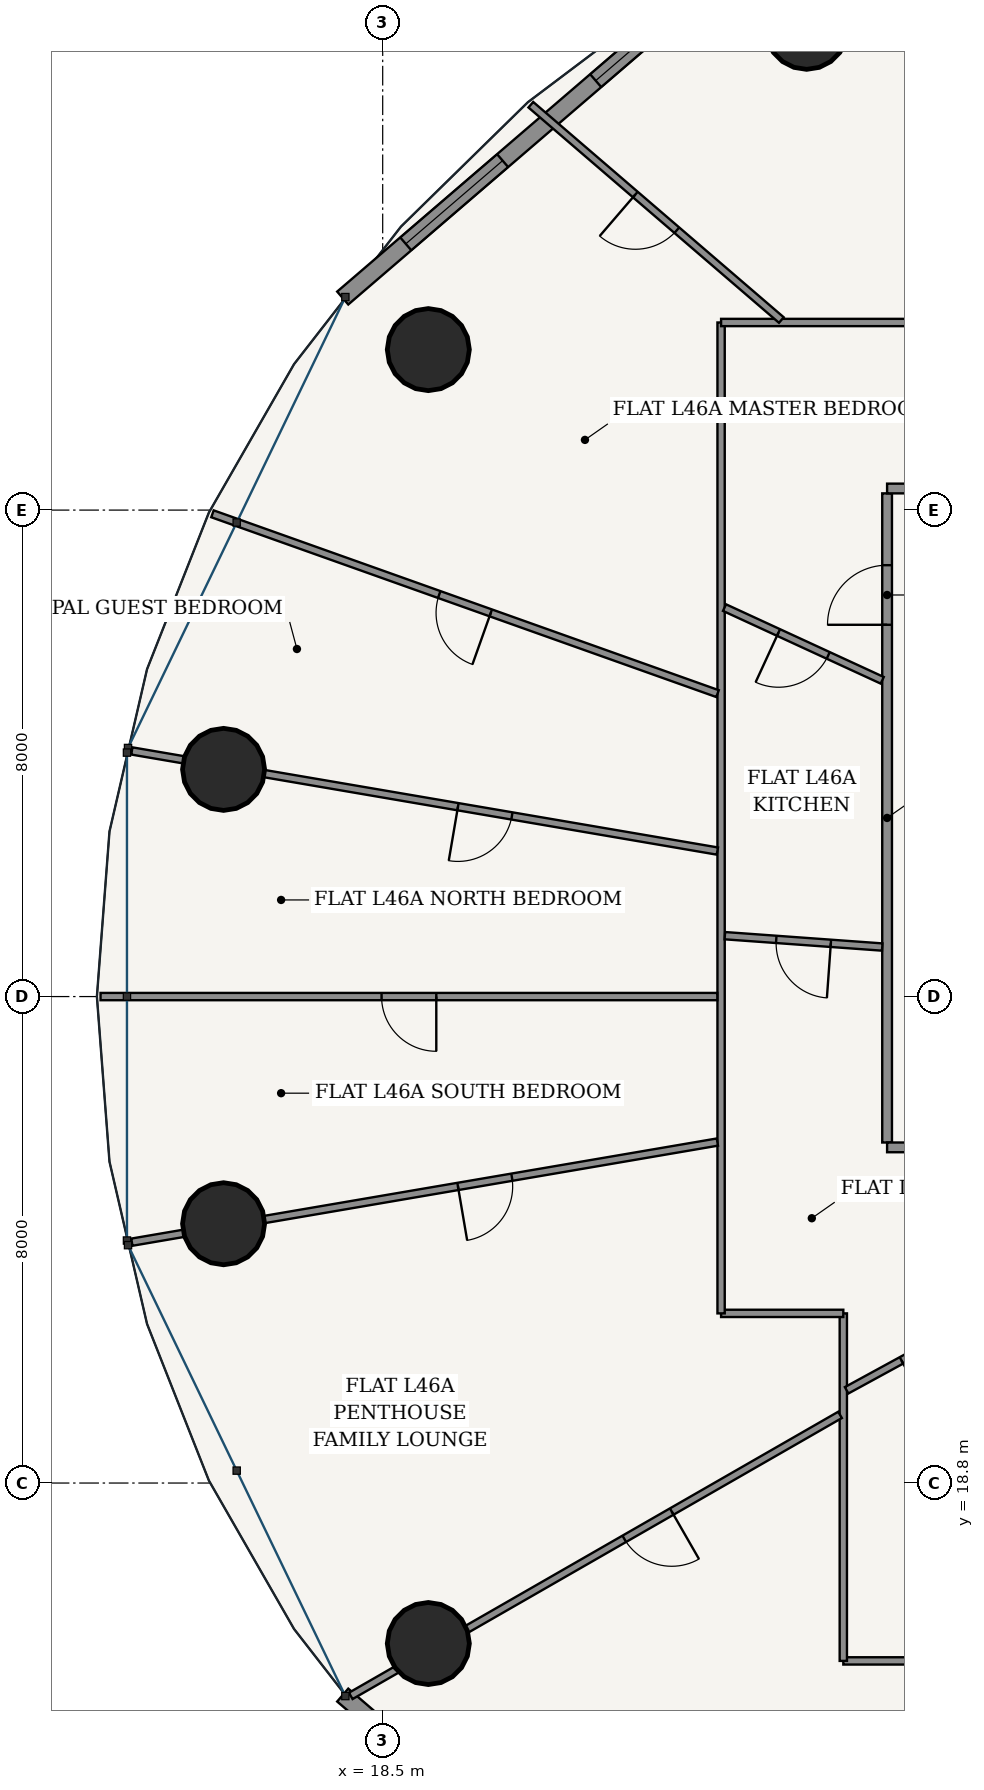
"""IFC4 building model, lengths in metres.
Left out: names, types, materials, properties, quantities, classifications, styles, units other than length and angle.
Written with IfcOpenShell. Run it as: python <this file> out.ifc"""

import sys

from ifc_helpers import new_model, si_unit, direction, frame, frame_2d, origin, origin_2d, place, context, subcontext, project, spatial, rectangle, hollow_circle, extrude, source, transform, mapped, element, fill, save


model = new_model("IFC4")
c1 = context("Model", 3, precision=1e-05, world=origin(), true_north=direction((-0.2419218956, 0.970295726276)))
c2 = subcontext(c1, "Body", "Model", "MODEL_VIEW")
j1 = project(units=[si_unit("LENGTHUNIT", "METRE"), si_unit("PLANEANGLEUNIT", "RADIAN")], contexts=[c1])
p1 = place(None, origin())
s1 = spatial("IfcSite", under=j1, at=p1, CompositionType="ELEMENT")
p2 = place(p1, origin())
s2 = spatial("IfcBuilding", under=s1, at=p2, CompositionType="ELEMENT")
p3 = place(p2, frame((0.0, 0.0, 175.0)))
s3 = spatial("IfcBuildingStorey", under=s2, at=p3, CompositionType="ELEMENT", Elevation=175.0)
for number, where, z_axis, x_axis in (
    (1, (25.472, 42.723, 0.0), (0.0, 0.0, 1.0), (1.0, 0.0, 0.0)),
    (2, (19.25, 37.439, 0.0), (0.0, 0.0, 1.0), (1.0, 0.0, 0.0)),
    (3, (15.883, 30.536, 0.0), (0.0, 0.0, 1.0), (1.0, 0.0, 0.0)),
    (4, (15.883, 23.064, 0.0), (0.0, 0.0, 1.0), (1.0, 0.0, 0.0)),
    (5, (19.25, 16.161, 0.0), (0.0, 0.0, 1.0), (1.0, 0.0, 0.0)),
):
    element("IfcColumn", number, at=place(p3, frame(where, z_axis=z_axis, x_axis=x_axis)), inside=s3, PredefinedType="COLUMN", context=c2, shape_type="SweptSolid", body=[
        extrude(hollow_circle(Radius=0.675, WallThickness=0.042, at=origin_2d()), origin(), (0.0, 0.0, 1.0), 3.6),
    ])
p4 = place(p3, frame((24.633, 44.122, 0.0), z_axis=(0.0, 0.0, 1.0), x_axis=(-0.75843401647, -0.651749831348, 0.0)))
e6 = element("IfcWall", 6, at=p4, inside=s3, PredefinedType="SOLIDWALL", context=c2, shape_type="SweptSolid", body=[
    extrude(rectangle(XDim=8.952, YDim=0.28, at=frame_2d((4.476, 0.0))), origin(), (0.0, 0.0, 1.0), 3.33),
])
p5 = place(p4, frame((1.367, 0.0, 0.85)))
e7 = element("IfcOpeningElement", 7, at=p5, cuts=e6, PredefinedType="OPENING", context=c2, shape_type="SweptSolid", body=[
    extrude(rectangle(XDim=2.1, YDim=1.95, at=frame_2d((1.05, 0.975))), frame((0.0, 0.15, 0.0), z_axis=(0.0, -1.0, 0.0), x_axis=(1.0, 0.0, 0.0)), (0.0, 0.0, 1.0), 0.3),
])
p6 = place(p4, frame((5.485, 0.0, 0.85)))
e8 = element("IfcOpeningElement", 8, at=p6, cuts=e6, PredefinedType="OPENING", context=c2, shape_type="SweptSolid", body=[
    extrude(rectangle(XDim=2.1, YDim=1.95, at=frame_2d((1.05, 0.975))), frame((0.0, 0.15, 0.0), z_axis=(0.0, -1.0, 0.0), x_axis=(1.0, 0.0, 0.0)), (0.0, 0.0, 1.0), 0.3),
])
p7 = place(p3, frame((17.843, 15.313, 0.0), z_axis=(0.0, 0.0, 1.0), x_axis=(0.75843401647, -0.651749831348, 0.0)))
e9 = element("IfcWall", 9, at=p7, inside=s3, PredefinedType="SOLIDWALL", context=c2, shape_type="SweptSolid", body=[
    extrude(rectangle(XDim=8.952, YDim=0.28, at=frame_2d((4.476, 0.0))), origin(), (0.0, 0.0, 1.0), 3.33),
])
p8 = place(p7, frame((1.367, 0.0, 0.85)))
e10 = element("IfcOpeningElement", 10, at=p8, cuts=e9, PredefinedType="OPENING", context=c2, shape_type="SweptSolid", body=[
    extrude(rectangle(XDim=2.1, YDim=1.95, at=frame_2d((1.05, 0.975))), frame((0.0, 0.15, 0.0), z_axis=(0.0, -1.0, 0.0), x_axis=(1.0, 0.0, 0.0)), (0.0, 0.0, 1.0), 0.3),
])
p9 = place(p7, frame((5.485, 0.0, 0.85)))
e11 = element("IfcOpeningElement", 11, at=p9, cuts=e9, PredefinedType="OPENING", context=c2, shape_type="SweptSolid", body=[
    extrude(rectangle(XDim=2.1, YDim=1.95, at=frame_2d((1.05, 0.975))), frame((0.0, 0.15, 0.0), z_axis=(0.0, -1.0, 0.0), x_axis=(1.0, 0.0, 0.0)), (0.0, 0.0, 1.0), 0.3),
])
p10 = place(p3, frame((26.795, 24.4, 0.0), z_axis=(0.0, 0.0, 1.0), x_axis=(0.0, 1.0, 0.0)))
e12 = element("IfcWall", 12, at=p10, inside=s3, PredefinedType="PARTITIONING", context=c2, shape_type="SweptSolid", body=[
    extrude(rectangle(XDim=10.675, YDim=0.16, at=frame_2d((5.337, 0.0))), origin(), (0.0, 0.0, 1.0), 2.776),
])
p11 = place(p10, frame((8.514, 0.0, 0.0)))
e13 = element("IfcOpeningElement", 13, at=p11, cuts=e12, PredefinedType="OPENING", context=c2, shape_type="SweptSolid", body=[
    extrude(rectangle(XDim=0.98, YDim=2.2, at=frame_2d((0.49, 1.1))), frame((0.0, 0.09, 0.0), z_axis=(0.0, -1.0, 0.0), x_axis=(1.0, 0.0, 0.0)), (0.0, 0.0, 1.0), 0.18),
])
p12 = place(p3, frame((26.795, 35.155, 0.0), z_axis=(0.0, 0.0, 1.0), x_axis=(1.0, 0.0, 0.0)))
e14 = element("IfcWall", 14, at=p12, inside=s3, PredefinedType="PARTITIONING", context=c2, shape_type="SweptSolid", body=[
    extrude(rectangle(XDim=1.93, YDim=0.16, at=frame_2d((0.965, 0.0))), origin(), (0.0, 0.0, 1.0), 2.776),
])
p13 = place(p3, frame((26.795, 24.32, 0.0), z_axis=(0.0, 0.0, 1.0), x_axis=(1.0, 0.0, 0.0)))
e15 = element("IfcWall", 15, at=p13, inside=s3, PredefinedType="PARTITIONING", context=c2, shape_type="SweptSolid", body=[
    extrude(rectangle(XDim=1.93, YDim=0.16, at=frame_2d((0.965, 0.0))), origin(), (0.0, 0.0, 1.0), 3.33),
])
p14 = place(p3, frame((31.59, 15.875, 0.0), z_axis=(0.0, 0.0, 1.0), x_axis=(-1.0, 0.0, 0.0)))
e16 = element("IfcWall", 16, at=p14, inside=s3, PredefinedType="PARTITIONING", context=c2, shape_type="SweptSolid", body=[
    extrude(rectangle(XDim=5.515, YDim=0.12, at=frame_2d((2.758, 0.0))), origin(), (0.0, 0.0, 1.0), 2.776),
])
p15 = place(p3, frame((26.075, 15.875, 0.0), z_axis=(0.0, 0.0, 1.0), x_axis=(0.0, 1.0, 0.0)))
e17 = element("IfcWall", 17, at=p15, inside=s3, PredefinedType="PARTITIONING", context=c2, shape_type="SweptSolid", body=[
    extrude(rectangle(XDim=5.715, YDim=0.12, at=frame_2d((2.857, 0.0))), origin(), (0.0, 0.0, 1.0), 2.776),
])
p16 = place(p3, frame((26.075, 21.59, 0.0), z_axis=(0.0, 0.0, 1.0), x_axis=(-1.0, 0.0, 0.0)))
e18 = element("IfcWall", 18, at=p16, inside=s3, PredefinedType="PARTITIONING", context=c2, shape_type="SweptSolid", body=[
    extrude(rectangle(XDim=2.01, YDim=0.12, at=frame_2d((1.005, 0.0))), origin(), (0.0, 0.0, 1.0), 3.33),
])
p17 = place(p3, frame((24.065, 21.59, 0.0), z_axis=(0.0, 0.0, 1.0), x_axis=(0.0, 1.0, 0.0)))
e19 = element("IfcWall", 19, at=p17, inside=s3, PredefinedType="PARTITIONING", context=c2, shape_type="SweptSolid", body=[
    extrude(rectangle(XDim=16.295, YDim=0.12, at=frame_2d((8.147, 0.0))), origin(), (0.0, 0.0, 1.0), 2.776),
])
p18 = place(p3, frame((24.065, 37.885, 0.0), z_axis=(0.0, 0.0, 1.0), x_axis=(1.0, 0.0, 0.0)))
e20 = element("IfcWall", 20, at=p18, inside=s3, PredefinedType="PARTITIONING", context=c2, shape_type="SweptSolid", body=[
    extrude(rectangle(XDim=7.47, YDim=0.12, at=frame_2d((3.735, 0.0))), origin(), (0.0, 0.0, 1.0), 2.776),
])
p19 = place(p18, frame((3.62, 0.0, 0.0)))
e21 = element("IfcOpeningElement", 21, at=p19, cuts=e20, PredefinedType="OPENING", context=c2, shape_type="SweptSolid", body=[
    extrude(rectangle(XDim=0.9, YDim=2.15, at=frame_2d((0.45, 1.075))), frame((0.0, 0.07, 0.0), z_axis=(0.0, -1.0, 0.0), x_axis=(1.0, 0.0, 0.0)), (0.0, 0.0, 1.0), 0.14),
])
p20 = place(p3, frame((25.056, 37.925, 0.0), z_axis=(0.0, 0.0, 1.0), x_axis=(-0.758354915574, 0.65184186888, 0.0)))
e22 = element("IfcWall", 22, at=p20, inside=s3, PredefinedType="PARTITIONING", context=c2, shape_type="SweptSolid", body=[
    extrude(rectangle(XDim=5.432, YDim=0.12, at=frame_2d((2.716, 0.0))), origin(), (0.0, 0.0, 1.0), 2.846),
])
p21 = place(p20, frame((2.266, 0.0, 0.0)))
e23 = element("IfcOpeningElement", 23, at=p21, cuts=e22, PredefinedType="OPENING", context=c2, shape_type="SweptSolid", body=[
    extrude(rectangle(XDim=0.9, YDim=2.15, at=frame_2d((0.45, 1.075))), frame((0.0, 0.07, 0.0), z_axis=(0.0, -1.0, 0.0), x_axis=(1.0, 0.0, 0.0)), (0.0, 0.0, 1.0), 0.14),
])
p22 = place(p3, frame((24.007, 31.782, 0.0), z_axis=(0.0, 0.0, 1.0), x_axis=(-0.942077868165, 0.335394231187, 0.0)))
e24 = element("IfcWall", 24, at=p22, inside=s3, PredefinedType="PARTITIONING", context=c2, shape_type="SweptSolid", body=[
    extrude(rectangle(XDim=8.817, YDim=0.12, at=frame_2d((4.408, 0.0))), origin(), (0.0, 0.0, 1.0), 2.846),
])
p23 = place(p22, frame((3.958, 0.0, 0.0)))
e25 = element("IfcOpeningElement", 25, at=p23, cuts=e24, PredefinedType="OPENING", context=c2, shape_type="SweptSolid", body=[
    extrude(rectangle(XDim=0.9, YDim=2.15, at=frame_2d((0.45, 1.075))), frame((0.0, 0.07, 0.0), z_axis=(0.0, -1.0, 0.0), x_axis=(1.0, 0.0, 0.0)), (0.0, 0.0, 1.0), 0.14),
])
p24 = place(p3, frame((24.004, 29.193, 0.0), z_axis=(0.0, 0.0, 1.0), x_axis=(-0.985698378271, 0.168519159369, 0.0)))
e26 = element("IfcWall", 26, at=p24, inside=s3, PredefinedType="PARTITIONING", context=c2, shape_type="SweptSolid", body=[
    extrude(rectangle(XDim=9.769, YDim=0.12, at=frame_2d((4.884, 0.0))), origin(), (0.0, 0.0, 1.0), 2.776),
])
p25 = place(p24, frame((3.428, 0.0, 0.0)))
e27 = element("IfcOpeningElement", 27, at=p25, cuts=e26, PredefinedType="OPENING", context=c2, shape_type="SweptSolid", body=[
    extrude(rectangle(XDim=0.9, YDim=2.15, at=frame_2d((0.45, 1.075))), frame((0.0, 0.07, 0.0), z_axis=(0.0, -1.0, 0.0), x_axis=(1.0, 0.0, 0.0)), (0.0, 0.0, 1.0), 0.14),
])
p26 = place(p3, frame((24.003, 26.8, 0.0), z_axis=(0.0, 0.0, 1.0), x_axis=(-1.0, 0.0, 0.0)))
e28 = element("IfcWall", 28, at=p26, inside=s3, PredefinedType="PARTITIONING", context=c2, shape_type="SweptSolid", body=[
    extrude(rectangle(XDim=10.143, YDim=0.12, at=frame_2d((5.071, 0.0))), origin(), (0.0, 0.0, 1.0), 2.846),
])
p27 = place(p26, frame((4.622, 0.0, 0.0)))
e29 = element("IfcOpeningElement", 29, at=p27, cuts=e28, PredefinedType="OPENING", context=c2, shape_type="SweptSolid", body=[
    extrude(rectangle(XDim=0.9, YDim=2.15, at=frame_2d((0.45, 1.075))), frame((0.0, 0.07, 0.0), z_axis=(0.0, -1.0, 0.0), x_axis=(1.0, 0.0, 0.0)), (0.0, 0.0, 1.0), 0.14),
])
p28 = place(p3, frame((24.004, 24.407, 0.0), z_axis=(0.0, 0.0, 1.0), x_axis=(-0.985698378271, -0.168519159369, 0.0)))
e30 = element("IfcWall", 30, at=p28, inside=s3, PredefinedType="PARTITIONING", context=c2, shape_type="SweptSolid", body=[
    extrude(rectangle(XDim=9.769, YDim=0.12, at=frame_2d((4.884, 0.0))), origin(), (0.0, 0.0, 1.0), 2.776),
])
p29 = place(p28, frame((3.428, 0.0, 0.0)))
e31 = element("IfcOpeningElement", 31, at=p29, cuts=e30, PredefinedType="OPENING", context=c2, shape_type="SweptSolid", body=[
    extrude(rectangle(XDim=0.9, YDim=2.15, at=frame_2d((0.45, 1.075))), frame((0.0, 0.07, 0.0), z_axis=(0.0, -1.0, 0.0), x_axis=(1.0, 0.0, 0.0)), (0.0, 0.0, 1.0), 0.14),
])
p30 = place(p3, frame((26.021, 19.921, 0.0), z_axis=(0.0, 0.0, 1.0), x_axis=(-0.867161148693, -0.498027652041, 0.0)))
e32 = element("IfcWall", 32, at=p30, inside=s3, PredefinedType="PARTITIONING", context=c2, shape_type="SweptSolid", body=[
    extrude(rectangle(XDim=9.279, YDim=0.12, at=frame_2d((4.64, 0.0))), origin(), (0.0, 0.0, 1.0), 2.776),
])
p31 = place(p30, frame((3.192, 0.0, 0.0)))
e33 = element("IfcOpeningElement", 33, at=p31, cuts=e32, PredefinedType="OPENING", context=c2, shape_type="SweptSolid", body=[
    extrude(rectangle(XDim=0.9, YDim=2.15, at=frame_2d((0.45, 1.075))), frame((0.0, 0.07, 0.0), z_axis=(0.0, -1.0, 0.0), x_axis=(1.0, 0.0, 0.0)), (0.0, 0.0, 1.0), 0.14),
])
p32 = place(p3, frame((29.469, 15.826, 0.0), z_axis=(0.0, 0.0, 1.0), x_axis=(-0.61373942367, -0.789508657225, 0.0)))
e34 = element("IfcWall", 34, at=p32, inside=s3, PredefinedType="PARTITIONING", context=c2, shape_type="SweptSolid", body=[
    extrude(rectangle(XDim=7.898, YDim=0.12, at=frame_2d((3.949, 0.0))), origin(), (0.0, 0.0, 1.0), 2.776),
])
p33 = place(p32, frame((2.5, 0.0, 0.0)))
e35 = element("IfcOpeningElement", 35, at=p33, cuts=e34, PredefinedType="OPENING", context=c2, shape_type="SweptSolid", body=[
    extrude(rectangle(XDim=0.9, YDim=2.15, at=frame_2d((0.45, 1.075))), frame((0.0, 0.07, 0.0), z_axis=(0.0, -1.0, 0.0), x_axis=(1.0, 0.0, 0.0)), (0.0, 0.0, 1.0), 0.14),
])
p34 = place(p3, frame((26.715, 32.001, 0.0), z_axis=(0.0, 0.0, 1.0), x_axis=(-0.90819942915, 0.418537688735, 0.0)))
e36 = element("IfcWall", 36, at=p34, inside=s3, PredefinedType="PARTITIONING", context=c2, shape_type="SweptSolid", body=[
    extrude(rectangle(XDim=2.856, YDim=0.12, at=frame_2d((1.428, 0.0))), origin(), (0.0, 0.0, 1.0), 3.33),
])
p35 = place(p34, frame((0.978, 0.0, 0.0)))
e37 = element("IfcOpeningElement", 37, at=p35, cuts=e36, PredefinedType="OPENING", context=c2, shape_type="SweptSolid", body=[
    extrude(rectangle(XDim=0.9, YDim=2.15, at=frame_2d((0.45, 1.075))), frame((0.0, 0.07, 0.0), z_axis=(0.0, -1.0, 0.0), x_axis=(1.0, 0.0, 0.0)), (0.0, 0.0, 1.0), 0.14),
])
p36 = place(p3, frame((26.715, 27.615, 0.0), z_axis=(0.0, 0.0, 1.0), x_axis=(-0.997406375801, 0.071975839778, 0.0)))
e38 = element("IfcWall", 38, at=p36, inside=s3, PredefinedType="PARTITIONING", context=c2, shape_type="SweptSolid", body=[
    extrude(rectangle(XDim=2.595, YDim=0.12, at=frame_2d((1.297, 0.0))), origin(), (0.0, 0.0, 1.0), 3.33),
])
p37 = place(p36, frame((0.847, 0.0, 0.0)))
e39 = element("IfcOpeningElement", 39, at=p37, cuts=e38, PredefinedType="OPENING", context=c2, shape_type="SweptSolid", body=[
    extrude(rectangle(XDim=0.9, YDim=2.15, at=frame_2d((0.45, 1.075))), frame((0.0, 0.07, 0.0), z_axis=(0.0, -1.0, 0.0), x_axis=(1.0, 0.0, 0.0)), (0.0, 0.0, 1.0), 0.14),
])
p38 = place(p3, frame((28.723, 21.74, 0.0), z_axis=(0.0, 0.0, 1.0), x_axis=(-0.877892414948, -0.47885792024, 0.0)))
e40 = element("IfcWall", 40, at=p38, inside=s3, PredefinedType="PARTITIONING", context=c2, shape_type="SweptSolid", body=[
    extrude(rectangle(XDim=2.955, YDim=0.12, at=frame_2d((1.477, 0.0))), origin(), (0.0, 0.0, 1.0), 3.33),
])
p39 = place(p38, frame((1.027, 0.0, 0.0)))
e41 = element("IfcOpeningElement", 41, at=p39, cuts=e40, PredefinedType="OPENING", context=c2, shape_type="SweptSolid", body=[
    extrude(rectangle(XDim=0.9, YDim=2.15, at=frame_2d((0.45, 1.075))), frame((0.0, 0.07, 0.0), z_axis=(0.0, -1.0, 0.0), x_axis=(1.0, 0.0, 0.0)), (0.0, 0.0, 1.0), 0.14),
])
m1 = source(origin(), c2, "Body", "SweptSolid", [
    extrude(rectangle(XDim=2.1, YDim=1.95, at=frame_2d((1.05, 0.975))), frame((0.0, 0.03, 0.0), z_axis=(0.0, -1.0, 0.0), x_axis=(1.0, 0.0, 0.0)), (0.0, 0.0, 1.0), 0.06),
])
p40 = place(p5, origin())
e42 = element("IfcWindow", 42, at=p40, inside=s3, PartitioningType="SINGLE_PANEL", PredefinedType="WINDOW", context=c2, shape_type="MappedRepresentation", body=[
    mapped(m1, transform((0.0, 0.0, 0.0), scale=1.0)),
])
fill(e7, e42)
p41 = place(p6, origin())
e43 = element("IfcWindow", 43, at=p41, inside=s3, PartitioningType="SINGLE_PANEL", PredefinedType="WINDOW", context=c2, shape_type="MappedRepresentation", body=[
    mapped(m1, transform((0.0, 0.0, 0.0), scale=1.0)),
])
fill(e8, e43)
m2 = source(origin(), c2, "Body", "SweptSolid", [
    extrude(rectangle(XDim=0.98, YDim=2.2, at=frame_2d((0.49, 1.1))), frame((0.0, 0.025, 0.0), z_axis=(0.0, -1.0, 0.0), x_axis=(1.0, 0.0, 0.0)), (0.0, 0.0, 1.0), 0.05),
])
p42 = place(p11, origin())
e44 = element("IfcDoor", 44, at=p42, inside=s3, OperationType="SINGLE_SWING_LEFT", PredefinedType="DOOR", context=c2, shape_type="MappedRepresentation", body=[
    mapped(m2, transform((0.0, 0.0, 0.0), scale=1.0)),
])
fill(e13, e44)
m3 = source(origin(), c2, "Body", "SweptSolid", [
    extrude(rectangle(XDim=0.9, YDim=2.15, at=frame_2d((0.45, 1.075))), frame((0.0, 0.025, 0.0), z_axis=(0.0, -1.0, 0.0), x_axis=(1.0, 0.0, 0.0)), (0.0, 0.0, 1.0), 0.05),
])
p43 = place(p35, origin())
e45 = element("IfcDoor", 45, at=p43, inside=s3, OperationType="SINGLE_SWING_RIGHT", PredefinedType="DOOR", context=c2, shape_type="MappedRepresentation", body=[
    mapped(m3, transform((0.0, 0.0, 0.0), scale=1.0)),
])
fill(e37, e45)
p44 = place(p37, origin())
e46 = element("IfcDoor", 46, at=p44, inside=s3, OperationType="SINGLE_SWING_LEFT", PredefinedType="DOOR", context=c2, shape_type="MappedRepresentation", body=[
    mapped(m3, transform((0.0, 0.0, 0.0), scale=1.0)),
])
fill(e39, e46)
p45 = place(p39, origin())
e47 = element("IfcDoor", 47, at=p45, inside=s3, OperationType="SINGLE_SWING_RIGHT", PredefinedType="DOOR", context=c2, shape_type="MappedRepresentation", body=[
    mapped(m3, transform((0.0, 0.0, 0.0), scale=1.0)),
])
fill(e41, e47)
p46 = place(p21, origin())
e48 = element("IfcDoor", 48, at=p46, inside=s3, OperationType="SINGLE_SWING_RIGHT", PredefinedType="DOOR", context=c2, shape_type="MappedRepresentation", body=[
    mapped(m3, transform((0.0, 0.0, 0.0), scale=1.0)),
])
fill(e23, e48)
p47 = place(p23, origin())
e49 = element("IfcDoor", 49, at=p47, inside=s3, OperationType="SINGLE_SWING_LEFT", PredefinedType="DOOR", context=c2, shape_type="MappedRepresentation", body=[
    mapped(m3, transform((0.0, 0.0, 0.0), scale=1.0)),
])
fill(e25, e49)
p48 = place(p25, origin())
e50 = element("IfcDoor", 50, at=p48, inside=s3, OperationType="SINGLE_SWING_RIGHT", PredefinedType="DOOR", context=c2, shape_type="MappedRepresentation", body=[
    mapped(m3, transform((0.0, 0.0, 0.0), scale=1.0)),
])
fill(e27, e50)
p49 = place(p27, origin())
e51 = element("IfcDoor", 51, at=p49, inside=s3, OperationType="SINGLE_SWING_LEFT", PredefinedType="DOOR", context=c2, shape_type="MappedRepresentation", body=[
    mapped(m3, transform((0.0, 0.0, 0.0), scale=1.0)),
])
fill(e29, e51)
p50 = place(p29, origin())
e52 = element("IfcDoor", 52, at=p50, inside=s3, OperationType="SINGLE_SWING_RIGHT", PredefinedType="DOOR", context=c2, shape_type="MappedRepresentation", body=[
    mapped(m3, transform((0.0, 0.0, 0.0), scale=1.0)),
])
fill(e31, e52)
p51 = place(p31, origin())
e53 = element("IfcDoor", 53, at=p51, inside=s3, OperationType="SINGLE_SWING_LEFT", PredefinedType="DOOR", context=c2, shape_type="MappedRepresentation", body=[
    mapped(m3, transform((0.0, 0.0, 0.0), scale=1.0)),
])
fill(e33, e53)
save(model, sys.argv[1])
